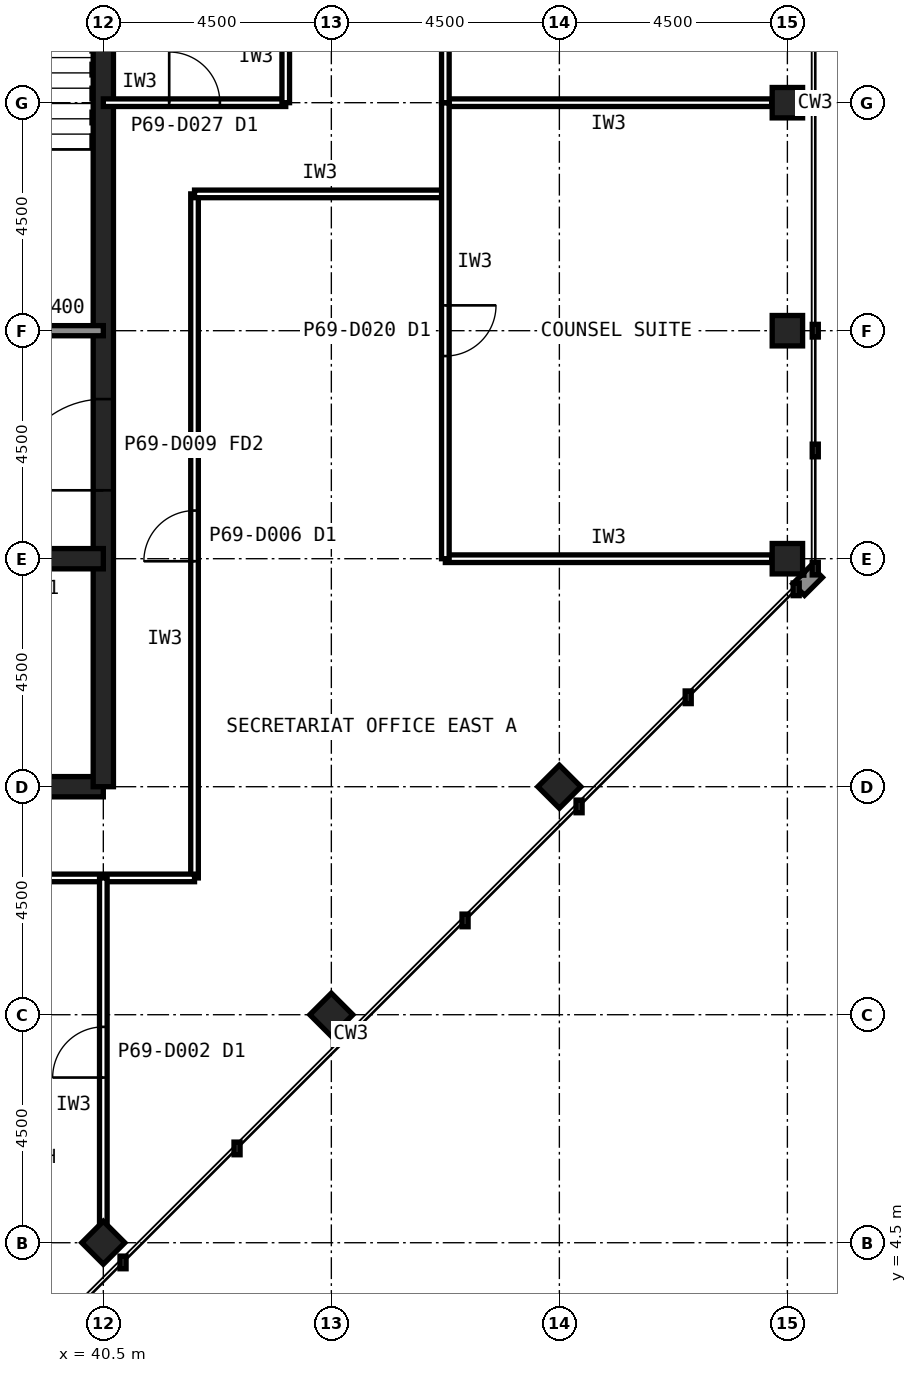
"""IFC4 building model, lengths in metres.
Left out: names, types, materials, properties, quantities, classifications, styles, units other than length and angle.
Written with IfcOpenShell. Run it as: python <this file> out.ifc"""

import sys

from ifc_helpers import new_model, si_unit, direction, frame, frame_2d, origin, origin_2d, place, context, subcontext, project, spatial, rectangle, hollow_rectangle, extrude, element, fill, save


model = new_model("IFC4")
c1 = context("Model", 3, precision=1e-05, world=origin(), true_north=direction((0.0, 1.0)))
c2 = subcontext(c1, "Body", "Model", "MODEL_VIEW")
j1 = project(units=[si_unit("LENGTHUNIT", "METRE"), si_unit("PLANEANGLEUNIT", "RADIAN")], contexts=[c1])
p1 = place(None, origin())
s1 = spatial("IfcSite", under=j1, at=p1, CompositionType="ELEMENT")
p2 = place(p1, origin())
s2 = spatial("IfcBuilding", under=s1, at=p2, CompositionType="ELEMENT")
p3 = place(p2, frame((0.0, 0.0, 286.6)))
s3 = spatial("IfcBuildingStorey", under=s2, at=p3, CompositionType="ELEMENT", Elevation=286.6)
for number, where, z_axis, x_axis in (
    (1, (54.0, 18.0, 0.0), (0.0, 0.0, 1.0), (1.0, 0.0, 0.0)),
    (2, (54.0, 22.5, 0.0), (0.0, 0.0, 1.0), (1.0, 0.0, 0.0)),
    (3, (54.0, 27.0, 0.0), (0.0, 0.0, 1.0), (1.0, 0.0, 0.0)),
    (4, (40.5, 4.5, 0.0), (0.0, 0.0, 1.0), (0.707, 0.707, 0.0)),
    (5, (45.0, 9.0, 0.0), (0.0, 0.0, 1.0), (0.707, 0.707, 0.0)),
    (6, (49.5, 13.5, 0.0), (0.0, 0.0, 1.0), (0.707, 0.707, 0.0)),
):
    element("IfcColumn", number, at=place(p3, frame(where, z_axis=z_axis, x_axis=x_axis)), inside=s3, PredefinedType="COLUMN", context=c2, shape_type="SweptSolid", body=[
        extrude(hollow_rectangle(XDim=0.6, YDim=0.6, WallThickness=0.028, at=origin_2d()), origin(), (0.0, 0.0, 1.0), 4.0),
    ])
p4 = place(p3, frame((13.5, 13.5, 0.0), z_axis=(0.0, 0.0, 1.0), x_axis=(1.0, 0.0, 0.0)))
e7 = element("IfcWall", 7, at=p4, inside=s3, PredefinedType="SHEAR", context=c2, shape_type="SweptSolid", body=[
    extrude(rectangle(XDim=27.0, YDim=0.4, at=frame_2d((13.5, 0.0))), origin(), (0.0, 0.0, 1.0), 4.0),
])
p5 = place(p3, frame((40.5, 13.5, 0.0), z_axis=(0.0, 0.0, 1.0), x_axis=(0.0, 1.0, 0.0)))
e8 = element("IfcWall", 8, at=p5, inside=s3, PredefinedType="SHEAR", context=c2, shape_type="SweptSolid", body=[
    extrude(rectangle(XDim=27.0, YDim=0.4, at=frame_2d((13.5, 0.0))), origin(), (0.0, 0.0, 1.0), 4.0),
])
p6 = place(p5, frame((5.85, 0.0, 0.0)))
e9 = element("IfcOpeningElement", 9, at=p6, cuts=e8, PredefinedType="OPENING", context=c2, shape_type="SweptSolid", body=[
    extrude(rectangle(XDim=1.8, YDim=2.1, at=frame_2d((0.9, 1.05))), frame((0.0, 0.21, 0.0), z_axis=(0.0, -1.0, 0.0), x_axis=(1.0, 0.0, 0.0)), (0.0, 0.0, 1.0), 0.42),
])
p7 = place(p5, frame((19.65, 0.0, 0.0)))
e10 = element("IfcOpeningElement", 10, at=p7, cuts=e8, PredefinedType="OPENING", context=c2, shape_type="SweptSolid", body=[
    extrude(rectangle(XDim=1.2, YDim=2.1, at=frame_2d((0.6, 1.05))), frame((0.0, 0.21, 0.0), z_axis=(0.0, -1.0, 0.0), x_axis=(1.0, 0.0, 0.0)), (0.0, 0.0, 1.0), 0.42),
])
p8 = place(p3, frame((13.5, 18.0, 0.0), z_axis=(0.0, 0.0, 1.0), x_axis=(1.0, 0.0, 0.0)))
e11 = element("IfcWall", 11, at=p8, inside=s3, PredefinedType="SHEAR", context=c2, shape_type="SweptSolid", body=[
    extrude(rectangle(XDim=27.0, YDim=0.4, at=frame_2d((13.5, 0.0))), origin(), (0.0, 0.0, 1.0), 4.0),
])
p9 = place(p8, frame((24.3, 0.0, 0.0)))
e12 = element("IfcOpeningElement", 12, at=p9, cuts=e11, PredefinedType="OPENING", context=c2, shape_type="SweptSolid", body=[
    extrude(rectangle(XDim=0.9, YDim=2.1, at=frame_2d((0.45, 1.05))), frame((0.0, 0.21, 0.0), z_axis=(0.0, -1.0, 0.0), x_axis=(1.0, 0.0, 0.0)), (0.0, 0.0, 1.0), 0.42),
])
p10 = place(p8, frame((5.45, 0.0, 0.0)))
e13 = element("IfcOpeningElement", 13, at=p10, cuts=e11, PredefinedType="OPENING", context=c2, shape_type="SweptSolid", body=[
    extrude(rectangle(XDim=1.1, YDim=2.1, at=frame_2d((0.55, 1.05))), frame((0.0, 0.21, 0.0), z_axis=(0.0, -1.0, 0.0), x_axis=(1.0, 0.0, 0.0)), (0.0, 0.0, 1.0), 0.42),
])
p11 = place(p8, frame((8.45, 0.0, 0.0)))
e14 = element("IfcOpeningElement", 14, at=p11, cuts=e11, PredefinedType="OPENING", context=c2, shape_type="SweptSolid", body=[
    extrude(rectangle(XDim=1.1, YDim=2.1, at=frame_2d((0.55, 1.05))), frame((0.0, 0.21, 0.0), z_axis=(0.0, -1.0, 0.0), x_axis=(1.0, 0.0, 0.0)), (0.0, 0.0, 1.0), 0.42),
])
p12 = place(p8, frame((11.45, 0.0, 0.0)))
e15 = element("IfcOpeningElement", 15, at=p12, cuts=e11, PredefinedType="OPENING", context=c2, shape_type="SweptSolid", body=[
    extrude(rectangle(XDim=1.1, YDim=2.1, at=frame_2d((0.55, 1.05))), frame((0.0, 0.21, 0.0), z_axis=(0.0, -1.0, 0.0), x_axis=(1.0, 0.0, 0.0)), (0.0, 0.0, 1.0), 0.42),
])
p13 = place(p8, frame((14.45, 0.0, 0.0)))
e16 = element("IfcOpeningElement", 16, at=p13, cuts=e11, PredefinedType="OPENING", context=c2, shape_type="SweptSolid", body=[
    extrude(rectangle(XDim=1.1, YDim=2.1, at=frame_2d((0.55, 1.05))), frame((0.0, 0.21, 0.0), z_axis=(0.0, -1.0, 0.0), x_axis=(1.0, 0.0, 0.0)), (0.0, 0.0, 1.0), 0.42),
])
p14 = place(p8, frame((17.45, 0.0, 0.0)))
e17 = element("IfcOpeningElement", 17, at=p14, cuts=e11, PredefinedType="OPENING", context=c2, shape_type="SweptSolid", body=[
    extrude(rectangle(XDim=1.1, YDim=2.1, at=frame_2d((0.55, 1.05))), frame((0.0, 0.21, 0.0), z_axis=(0.0, -1.0, 0.0), x_axis=(1.0, 0.0, 0.0)), (0.0, 0.0, 1.0), 0.42),
])
p15 = place(p8, frame((20.45, 0.0, 0.0)))
e18 = element("IfcOpeningElement", 18, at=p15, cuts=e11, PredefinedType="OPENING", context=c2, shape_type="SweptSolid", body=[
    extrude(rectangle(XDim=1.1, YDim=2.1, at=frame_2d((0.55, 1.05))), frame((0.0, 0.21, 0.0), z_axis=(0.0, -1.0, 0.0), x_axis=(1.0, 0.0, 0.0)), (0.0, 0.0, 1.0), 0.42),
])
p16 = place(p8, frame((1.6, 0.0, 0.0)))
e19 = element("IfcOpeningElement", 19, at=p16, cuts=e11, PredefinedType="OPENING", context=c2, shape_type="SweptSolid", body=[
    extrude(rectangle(XDim=1.3, YDim=2.2, at=frame_2d((0.65, 1.1))), frame((0.0, 0.21, 0.0), z_axis=(0.0, -1.0, 0.0), x_axis=(1.0, 0.0, 0.0)), (0.0, 0.0, 1.0), 0.42),
])
p17 = place(p3, frame((13.5, 22.5, 0.0), z_axis=(0.0, 0.0, 1.0), x_axis=(1.0, 0.0, 0.0)))
e20 = element("IfcWall", 20, at=p17, inside=s3, PredefinedType="SOLIDWALL", context=c2, shape_type="SweptSolid", body=[
    extrude(rectangle(XDim=27.0, YDim=0.2, at=frame_2d((13.5, 0.0))), origin(), (0.0, 0.0, 1.0), 3.84),
])
p18 = place(p17, frame((1.65, 0.0, 0.0)))
e21 = element("IfcOpeningElement", 21, at=p18, cuts=e20, PredefinedType="OPENING", context=c2, shape_type="SweptSolid", body=[
    extrude(rectangle(XDim=1.2, YDim=2.1, at=frame_2d((0.6, 1.05))), frame((0.0, 0.11, 0.0), z_axis=(0.0, -1.0, 0.0), x_axis=(1.0, 0.0, 0.0)), (0.0, 0.0, 1.0), 0.22),
])
p19 = place(p17, frame((6.025, 0.0, 0.0)))
e22 = element("IfcOpeningElement", 22, at=p19, cuts=e20, PredefinedType="OPENING", context=c2, shape_type="SweptSolid", body=[
    extrude(rectangle(XDim=1.0, YDim=2.1, at=frame_2d((0.5, 1.05))), frame((0.0, 0.11, 0.0), z_axis=(0.0, -1.0, 0.0), x_axis=(1.0, 0.0, 0.0)), (0.0, 0.0, 1.0), 0.22),
])
p20 = place(p17, frame((10.525, 0.0, 0.0)))
e23 = element("IfcOpeningElement", 23, at=p20, cuts=e20, PredefinedType="OPENING", context=c2, shape_type="SweptSolid", body=[
    extrude(rectangle(XDim=1.0, YDim=2.1, at=frame_2d((0.5, 1.05))), frame((0.0, 0.11, 0.0), z_axis=(0.0, -1.0, 0.0), x_axis=(1.0, 0.0, 0.0)), (0.0, 0.0, 1.0), 0.22),
])
p21 = place(p17, frame((19.75, 0.0, 0.0)))
e24 = element("IfcOpeningElement", 24, at=p21, cuts=e20, PredefinedType="OPENING", context=c2, shape_type="SweptSolid", body=[
    extrude(rectangle(XDim=1.0, YDim=2.1, at=frame_2d((0.5, 1.05))), frame((0.0, 0.11, 0.0), z_axis=(0.0, -1.0, 0.0), x_axis=(1.0, 0.0, 0.0)), (0.0, 0.0, 1.0), 0.22),
])
p22 = place(p17, frame((15.05, 0.0, 0.0)))
e25 = element("IfcOpeningElement", 25, at=p22, cuts=e20, PredefinedType="OPENING", context=c2, shape_type="SweptSolid", body=[
    extrude(rectangle(XDim=1.4, YDim=2.4, at=frame_2d((0.7, 1.2))), frame((0.0, 0.11, 0.0), z_axis=(0.0, -1.0, 0.0), x_axis=(1.0, 0.0, 0.0)), (0.0, 0.0, 1.0), 0.22),
])
p23 = place(p3, frame((42.3, 11.7, 0.0), z_axis=(0.0, 0.0, 1.0), x_axis=(0.0, 1.0, 0.0)))
e26 = element("IfcWall", 26, at=p23, inside=s3, PredefinedType="PARTITIONING", context=c2, shape_type="SweptSolid", body=[
    extrude(rectangle(XDim=13.5, YDim=0.15, at=frame_2d((6.75, 0.0))), origin(), (0.0, 0.0, 1.0), 3.84),
])
p24 = place(p23, frame((6.25, 0.0, 0.0)))
e27 = element("IfcOpeningElement", 27, at=p24, cuts=e26, PredefinedType="OPENING", context=c2, shape_type="SweptSolid", body=[
    extrude(rectangle(XDim=1.0, YDim=2.1, at=frame_2d((0.5, 1.05))), frame((0.0, 0.085, 0.0), z_axis=(0.0, -1.0, 0.0), x_axis=(1.0, 0.0, 0.0)), (0.0, 0.0, 1.0), 0.17),
])
p25 = place(p3, frame((33.3, 11.7, 0.0), z_axis=(0.0, 0.0, 1.0), x_axis=(1.0, 0.0, 0.0)))
e28 = element("IfcWall", 28, at=p25, inside=s3, PredefinedType="PARTITIONING", context=c2, shape_type="SweptSolid", body=[
    extrude(rectangle(XDim=9.0, YDim=0.15, at=frame_2d((4.5, 0.0))), origin(), (0.0, 0.0, 1.0), 3.84),
])
p26 = place(p3, frame((42.3, 25.2, 0.0), z_axis=(0.0, 0.0, 1.0), x_axis=(1.0, 0.0, 0.0)))
e29 = element("IfcWall", 29, at=p26, inside=s3, PredefinedType="PARTITIONING", context=c2, shape_type="SweptSolid", body=[
    extrude(rectangle(XDim=4.95, YDim=0.15, at=frame_2d((2.475, 0.0))), origin(), (0.0, 0.0, 1.0), 3.84),
])
p27 = place(p3, frame((40.5, 27.0, 0.0), z_axis=(0.0, 0.0, 1.0), x_axis=(1.0, 0.0, 0.0)))
e30 = element("IfcWall", 30, at=p27, inside=s3, PredefinedType="PARTITIONING", context=c2, shape_type="SweptSolid", body=[
    extrude(rectangle(XDim=3.6, YDim=0.15, at=frame_2d((1.8, 0.0))), origin(), (0.0, 0.0, 1.0), 2.989),
])
p28 = place(p27, frame((1.3, 0.0, 0.0)))
e31 = element("IfcOpeningElement", 31, at=p28, cuts=e30, PredefinedType="OPENING", context=c2, shape_type="SweptSolid", body=[
    extrude(rectangle(XDim=1.0, YDim=2.1, at=frame_2d((0.5, 1.05))), frame((0.0, 0.085, 0.0), z_axis=(0.0, -1.0, 0.0), x_axis=(1.0, 0.0, 0.0)), (0.0, 0.0, 1.0), 0.17),
])
p29 = place(p3, frame((44.1, 27.0, 0.0), z_axis=(0.0, 0.0, 1.0), x_axis=(0.0, 1.0, 0.0)))
e32 = element("IfcWall", 32, at=p29, inside=s3, PredefinedType="PARTITIONING", context=c2, shape_type="SweptSolid", body=[
    extrude(rectangle(XDim=4.5, YDim=0.15, at=frame_2d((2.25, 0.0))), origin(), (0.0, 0.0, 1.0), 3.84),
])
for number, where, z_axis, x_axis in (
    (33, (47.25, 18.0, 0.0), (0.0, 0.0, 1.0), (1.0, 0.0, 0.0)),
    (34, (53.69, 27.0, 0.0), (0.0, 0.0, 1.0), (-1.0, 0.0, 0.0)),
):
    element("IfcWall", number, at=place(p3, frame(where, z_axis=z_axis, x_axis=x_axis)), inside=s3, PredefinedType="PARTITIONING", context=c2, shape_type="SweptSolid", body=[
        extrude(rectangle(XDim=6.44, YDim=0.15, at=frame_2d((3.22, 0.0))), origin(), (0.0, 0.0, 1.0), 2.989),
    ])
p30 = place(p3, frame((47.25, 27.0, 0.0), z_axis=(0.0, 0.0, 1.0), x_axis=(0.0, -1.0, 0.0)))
e35 = element("IfcWall", 35, at=p30, inside=s3, PredefinedType="PARTITIONING", context=c2, shape_type="SweptSolid", body=[
    extrude(rectangle(XDim=9.0, YDim=0.15, at=frame_2d((4.5, 0.0))), origin(), (0.0, 0.0, 1.0), 3.84),
])
p31 = place(p30, frame((4.0, 0.0, 0.0)))
e36 = element("IfcOpeningElement", 36, at=p31, cuts=e35, PredefinedType="OPENING", context=c2, shape_type="SweptSolid", body=[
    extrude(rectangle(XDim=1.0, YDim=2.1, at=frame_2d((0.5, 1.05))), frame((0.0, 0.085, 0.0), z_axis=(0.0, -1.0, 0.0), x_axis=(1.0, 0.0, 0.0)), (0.0, 0.0, 1.0), 0.17),
])
p32 = place(p3, frame((47.25, 36.0, 0.0), z_axis=(0.0, 0.0, 1.0), x_axis=(0.0, -1.0, 0.0)))
e37 = element("IfcWall", 37, at=p32, inside=s3, PredefinedType="PARTITIONING", context=c2, shape_type="SweptSolid", body=[
    extrude(rectangle(XDim=9.0, YDim=0.15, at=frame_2d((4.5, 0.0))), origin(), (0.0, 0.0, 1.0), 3.84),
])
p33 = place(p32, frame((4.0, 0.0, 0.0)))
e38 = element("IfcOpeningElement", 38, at=p33, cuts=e37, PredefinedType="OPENING", context=c2, shape_type="SweptSolid", body=[
    extrude(rectangle(XDim=1.0, YDim=2.1, at=frame_2d((0.5, 1.05))), frame((0.0, 0.085, 0.0), z_axis=(0.0, -1.0, 0.0), x_axis=(1.0, 0.0, 0.0)), (0.0, 0.0, 1.0), 0.17),
])
p34 = place(p3, frame((40.5, 4.82, 0.0), z_axis=(0.0, 0.0, 1.0), x_axis=(0.0, 1.0, 0.0)))
e39 = element("IfcWall", 39, at=p34, inside=s3, PredefinedType="PARTITIONING", context=c2, shape_type="SweptSolid", body=[
    extrude(rectangle(XDim=6.88, YDim=0.15, at=frame_2d((3.44, 0.0))), origin(), (0.0, 0.0, 1.0), 2.989),
])
p35 = place(p34, frame((2.94, 0.0, 0.0)))
e40 = element("IfcOpeningElement", 40, at=p35, cuts=e39, PredefinedType="OPENING", context=c2, shape_type="SweptSolid", body=[
    extrude(rectangle(XDim=1.0, YDim=2.1, at=frame_2d((0.5, 1.05))), frame((0.0, 0.085, 0.0), z_axis=(0.0, -1.0, 0.0), x_axis=(1.0, 0.0, 0.0)), (0.0, 0.0, 1.0), 0.17),
])
p36 = place(p6, origin())
e41 = element("IfcDoor", 41, at=p36, inside=s3, OperationType="SINGLE_SWING_LEFT", PredefinedType="DOOR", context=c2, shape_type="SweptSolid", body=[
    extrude(rectangle(XDim=1.8, YDim=2.1, at=frame_2d((0.9, 1.05))), frame((0.0, 0.025, 0.0), z_axis=(0.0, -1.0, 0.0), x_axis=(1.0, 0.0, 0.0)), (0.0, 0.0, 1.0), 0.05),
])
fill(e9, e41)
p37 = place(p24, origin())
e42 = element("IfcDoor", 42, at=p37, inside=s3, OperationType="SINGLE_SWING_LEFT", PredefinedType="DOOR", context=c2, shape_type="SweptSolid", body=[
    extrude(rectangle(XDim=1.0, YDim=2.1, at=frame_2d((0.5, 1.05))), frame((0.0, 0.025, 0.0), z_axis=(0.0, -1.0, 0.0), x_axis=(1.0, 0.0, 0.0)), (0.0, 0.0, 1.0), 0.05),
])
fill(e27, e42)
p38 = place(p28, origin())
e43 = element("IfcDoor", 43, at=p38, inside=s3, OperationType="SINGLE_SWING_LEFT", PredefinedType="DOOR", context=c2, shape_type="SweptSolid", body=[
    extrude(rectangle(XDim=1.0, YDim=2.1, at=frame_2d((0.5, 1.05))), frame((0.0, 0.025, 0.0), z_axis=(0.0, -1.0, 0.0), x_axis=(1.0, 0.0, 0.0)), (0.0, 0.0, 1.0), 0.05),
])
fill(e31, e43)
p39 = place(p31, origin())
e44 = element("IfcDoor", 44, at=p39, inside=s3, OperationType="SINGLE_SWING_LEFT", PredefinedType="DOOR", context=c2, shape_type="SweptSolid", body=[
    extrude(rectangle(XDim=1.0, YDim=2.1, at=frame_2d((0.5, 1.05))), frame((0.0, 0.025, 0.0), z_axis=(0.0, -1.0, 0.0), x_axis=(1.0, 0.0, 0.0)), (0.0, 0.0, 1.0), 0.05),
])
fill(e36, e44)
p40 = place(p35, origin())
e45 = element("IfcDoor", 45, at=p40, inside=s3, OperationType="SINGLE_SWING_LEFT", PredefinedType="DOOR", context=c2, shape_type="SweptSolid", body=[
    extrude(rectangle(XDim=1.0, YDim=2.1, at=frame_2d((0.5, 1.05))), frame((0.0, 0.025, 0.0), z_axis=(0.0, -1.0, 0.0), x_axis=(1.0, 0.0, 0.0)), (0.0, 0.0, 1.0), 0.05),
])
fill(e40, e45)
save(model, sys.argv[1])
